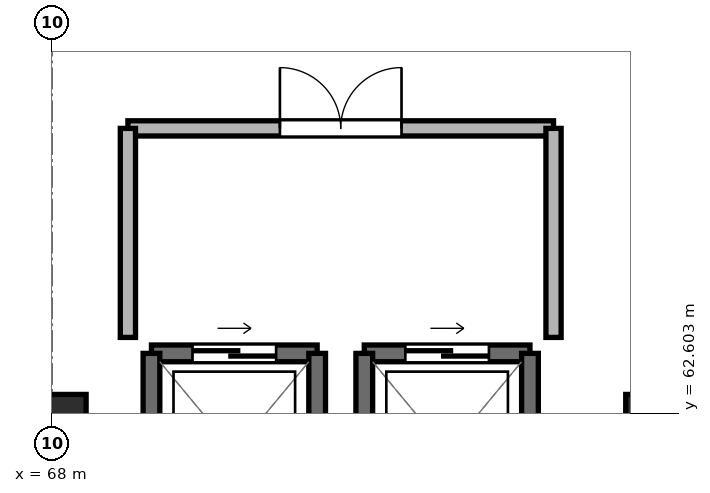
"""IFC4 building model, lengths in metres.
Left out: names, types, materials, properties, quantities, classifications, styles, units other than length and angle.
Written with IfcOpenShell. Run it as: python <this file> out.ifc"""

import sys

from ifc_helpers import new_model, si_unit, direction, frame, frame_2d, origin, origin_2d, place, context, subcontext, project, spatial, rectangle, extrude, element, fill, save


model = new_model("IFC4")
c1 = context("Model", 3, precision=1e-05, world=origin(), true_north=direction((0.0, 1.0)))
c2 = subcontext(c1, "Body", "Model", "MODEL_VIEW")
j1 = project(units=[si_unit("LENGTHUNIT", "METRE"), si_unit("PLANEANGLEUNIT", "RADIAN")], contexts=[c1])
p1 = place(None, origin())
s1 = spatial("IfcSite", under=j1, at=p1, CompositionType="ELEMENT")
p2 = place(p1, origin())
s2 = spatial("IfcBuilding", under=s1, at=p2, CompositionType="ELEMENT")
p3 = place(p2, frame((0.0, 0.0, 30.8)))
s3 = spatial("IfcBuildingStorey", under=s2, at=p3, CompositionType="ELEMENT", Elevation=30.8)
for number, where, z_axis, x_axis in (
    (1, (68.0, 62.4, -0.26), (0.0, 0.0, 1.0), (1.0, 0.0, 0.0)),
    (2, (76.0, 62.4, -0.26), (0.0, 0.0, 1.0), (1.0, 0.0, 0.0)),
):
    element("IfcColumn", number, at=place(p3, frame(where, z_axis=z_axis, x_axis=x_axis)), inside=s3, PredefinedType="COLUMN", context=c2, shape_type="SweptSolid", body=[
        extrude(rectangle(XDim=0.9, YDim=0.9, at=origin_2d()), origin(), (0.0, 0.0, 1.0), 3.26),
    ])
p4 = place(p3, frame((71.49, 63.39, 0.0), z_axis=(0.0, 0.0, 1.0), x_axis=(-1.0, 0.0, 0.0)))
e3 = element("IfcWall", 3, at=p4, inside=s3, PredefinedType="SHEAR", context=c2, shape_type="SweptSolid", body=[
    extrude(rectangle(XDim=2.18, YDim=0.22, at=frame_2d((1.09, 0.0))), origin(), (0.0, 0.0, 1.0), 3.0),
])
p5 = place(p4, frame((0.54, 0.0, 0.0)))
e4 = element("IfcOpeningElement", 4, at=p5, cuts=e3, PredefinedType="OPENING", context=c2, shape_type="SweptSolid", body=[
    extrude(rectangle(XDim=1.1, YDim=2.2, at=frame_2d((0.55, 1.1))), frame((0.0, 0.122, 0.0), z_axis=(0.0, -1.0, 0.0), x_axis=(1.0, 0.0, 0.0)), (0.0, 0.0, 1.0), 0.244),
])
for number, where, z_axis, x_axis in (
    (5, (69.31, 63.39, 0.0), (0.0, 0.0, 1.0), (0.0, -1.0, 0.0)),
    (6, (71.49, 60.81, 0.0), (0.0, 0.0, 1.0), (0.0, 1.0, 0.0)),
):
    element("IfcWall", number, at=place(p3, frame(where, z_axis=z_axis, x_axis=x_axis)), inside=s3, PredefinedType="SHEAR", context=c2, shape_type="SweptSolid", body=[
        extrude(rectangle(XDim=2.58, YDim=0.22, at=frame_2d((1.29, 0.0))), origin(), (0.0, 0.0, 1.0), 3.0),
    ])
p6 = place(p3, frame((74.29, 63.39, 0.0), z_axis=(0.0, 0.0, 1.0), x_axis=(-1.0, 0.0, 0.0)))
e7 = element("IfcWall", 7, at=p6, inside=s3, PredefinedType="SHEAR", context=c2, shape_type="SweptSolid", body=[
    extrude(rectangle(XDim=2.18, YDim=0.22, at=frame_2d((1.09, 0.0))), origin(), (0.0, 0.0, 1.0), 3.0),
])
p7 = place(p6, frame((0.54, 0.0, 0.0)))
e8 = element("IfcOpeningElement", 8, at=p7, cuts=e7, PredefinedType="OPENING", context=c2, shape_type="SweptSolid", body=[
    extrude(rectangle(XDim=1.1, YDim=2.2, at=frame_2d((0.55, 1.1))), frame((0.0, 0.122, 0.0), z_axis=(0.0, -1.0, 0.0), x_axis=(1.0, 0.0, 0.0)), (0.0, 0.0, 1.0), 0.244),
])
for number, where, z_axis, x_axis in (
    (9, (72.11, 63.39, 0.0), (0.0, 0.0, 1.0), (0.0, -1.0, 0.0)),
    (10, (74.29, 60.81, 0.0), (0.0, 0.0, 1.0), (0.0, 1.0, 0.0)),
):
    element("IfcWall", number, at=place(p3, frame(where, z_axis=z_axis, x_axis=x_axis)), inside=s3, PredefinedType="SHEAR", context=c2, shape_type="SweptSolid", body=[
        extrude(rectangle(XDim=2.58, YDim=0.22, at=frame_2d((1.29, 0.0))), origin(), (0.0, 0.0, 1.0), 3.0),
    ])
p8 = place(p3, frame((69.0, 66.35, 0.0), z_axis=(0.0, 0.0, 1.0), x_axis=(1.0, 0.0, 0.0)))
e11 = element("IfcWall", 11, at=p8, inside=s3, PredefinedType="PARTITIONING", context=c2, shape_type="SweptSolid", body=[
    extrude(rectangle(XDim=5.6, YDim=0.2, at=frame_2d((2.8, 0.0))), origin(), (0.0, 0.0, 1.0), 2.53),
])
p9 = place(p8, frame((2.0, 0.0, 0.0)))
e12 = element("IfcOpeningElement", 12, at=p9, cuts=e11, PredefinedType="OPENING", context=c2, shape_type="SweptSolid", body=[
    extrude(rectangle(XDim=1.6, YDim=2.2, at=frame_2d((0.8, 1.1))), frame((0.0, 0.112, 0.0), z_axis=(0.0, -1.0, 0.0), x_axis=(1.0, 0.0, 0.0)), (0.0, 0.0, 1.0), 0.224),
])
for number, where, z_axis, x_axis in (
    (13, (69.0, 63.6, 0.0), (0.0, 0.0, 1.0), (0.0, 1.0, 0.0)),
    (14, (74.6, 63.6, 0.0), (0.0, 0.0, 1.0), (0.0, 1.0, 0.0)),
):
    element("IfcWall", number, at=place(p3, frame(where, z_axis=z_axis, x_axis=x_axis)), inside=s3, PredefinedType="PARTITIONING", context=c2, shape_type="SweptSolid", body=[
        extrude(rectangle(XDim=2.75, YDim=0.2, at=frame_2d((1.375, 0.0))), origin(), (0.0, 0.0, 1.0), 2.53),
    ])
p10 = place(p5, origin())
e15 = element("IfcDoor", 15, at=p10, inside=s3, OperationType="SLIDING_TO_LEFT", PredefinedType="DOOR", context=c2, shape_type="SweptSolid", body=[
    extrude(rectangle(XDim=1.1, YDim=2.2, at=frame_2d((0.55, 1.1))), frame((0.0, 0.025, 0.0), z_axis=(0.0, -1.0, 0.0), x_axis=(1.0, 0.0, 0.0)), (0.0, 0.0, 1.0), 0.05),
])
fill(e4, e15)
p11 = place(p7, origin())
e16 = element("IfcDoor", 16, at=p11, inside=s3, OperationType="SLIDING_TO_LEFT", PredefinedType="DOOR", context=c2, shape_type="SweptSolid", body=[
    extrude(rectangle(XDim=1.1, YDim=2.2, at=frame_2d((0.55, 1.1))), frame((0.0, 0.025, 0.0), z_axis=(0.0, -1.0, 0.0), x_axis=(1.0, 0.0, 0.0)), (0.0, 0.0, 1.0), 0.05),
])
fill(e8, e16)
p12 = place(p9, origin())
e17 = element("IfcDoor", 17, at=p12, inside=s3, OperationType="DOUBLE_DOOR_SINGLE_SWING", PredefinedType="DOOR", context=c2, shape_type="SweptSolid", body=[
    extrude(rectangle(XDim=1.6, YDim=2.2, at=frame_2d((0.8, 1.1))), frame((0.0, 0.025, 0.0), z_axis=(0.0, -1.0, 0.0), x_axis=(1.0, 0.0, 0.0)), (0.0, 0.0, 1.0), 0.05),
])
fill(e12, e17)
save(model, sys.argv[1])
